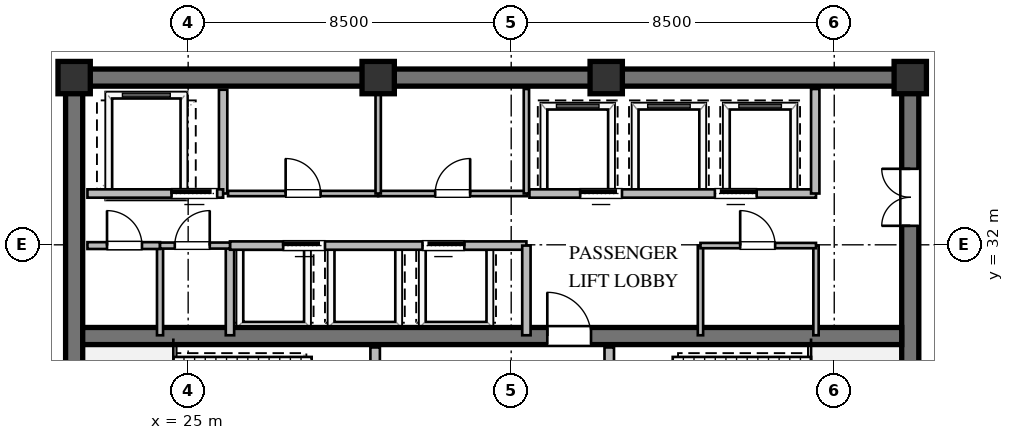
"""IFC4 building model, lengths in metres.
Left out: names, types, materials, properties, quantities, classifications, styles, units other than length and angle.
Written with IfcOpenShell. Run it as: python <this file> out.ifc"""

import sys

from ifc_helpers import new_model, si_unit, direction, frame, frame_2d, origin, origin_2d, place, context, subcontext, project, spatial, rectangle, extrude, element, fill, save


model = new_model("IFC4")
c1 = context("Model", 3, precision=1e-05, world=origin(), true_north=direction((0.0, 1.0)))
c2 = subcontext(c1, "Body", "Model", "MODEL_VIEW")
j1 = project(units=[si_unit("LENGTHUNIT", "METRE"), si_unit("PLANEANGLEUNIT", "RADIAN")], contexts=[c1])
p1 = place(None, origin())
s1 = spatial("IfcSite", under=j1, at=p1, CompositionType="ELEMENT")
p2 = place(p1, origin())
s2 = spatial("IfcBuilding", under=s1, at=p2, CompositionType="ELEMENT")
p3 = place(p2, frame((0.0, 0.0, 190.8)))
s3 = spatial("IfcBuildingStorey", under=s2, at=p3, CompositionType="ELEMENT", Elevation=190.8)
p4 = place(p3, frame((21.775, 36.4, 0.0), z_axis=(0.0, 0.0, 1.0), x_axis=(1.0, 0.0, 0.0)))
e1 = element("IfcWall", 1, at=p4, inside=s3, PredefinedType="SHEAR", context=c2, shape_type="SweptSolid", body=[
    extrude(rectangle(XDim=22.45, YDim=0.45, at=frame_2d((11.225, 0.0))), origin(), (0.0, 0.0, 1.0), 4.56),
])
p5 = place(p3, frame((22.0, 23.825, 0.0), z_axis=(0.0, 0.0, 1.0), x_axis=(0.0, 1.0, 0.0)))
e2 = element("IfcWall", 2, at=p5, inside=s3, PredefinedType="SHEAR", context=c2, shape_type="SweptSolid", body=[
    extrude(rectangle(XDim=12.35, YDim=0.45, at=frame_2d((6.175, 0.0))), origin(), (0.0, 0.0, 1.0), 4.56),
])
p6 = place(p3, frame((44.0, 23.825, 0.0), z_axis=(0.0, 0.0, 1.0), x_axis=(0.0, 1.0, 0.0)))
e3 = element("IfcWall", 3, at=p6, inside=s3, PredefinedType="SHEAR", context=c2, shape_type="SweptSolid", body=[
    extrude(rectangle(XDim=12.35, YDim=0.45, at=frame_2d((6.175, 0.0))), origin(), (0.0, 0.0, 1.0), 4.56),
])
p7 = place(p6, frame((8.675, 0.0, 0.0)))
e4 = element("IfcOpeningElement", 4, at=p7, cuts=e3, PredefinedType="OPENING", context=c2, shape_type="SweptSolid", body=[
    extrude(rectangle(XDim=1.5, YDim=2.15, at=frame_2d((0.75, 1.075))), frame((0.0, 0.235, 0.0), z_axis=(0.0, -1.0, 0.0), x_axis=(1.0, 0.0, 0.0)), (0.0, 0.0, 1.0), 0.47),
])
p8 = place(p3, frame((22.225, 29.6, 0.0), z_axis=(0.0, 0.0, 1.0), x_axis=(1.0, 0.0, 0.0)))
e5 = element("IfcWall", 5, at=p8, inside=s3, PredefinedType="SHEAR", context=c2, shape_type="SweptSolid", body=[
    extrude(rectangle(XDim=21.55, YDim=0.45, at=frame_2d((10.775, 0.0))), origin(), (0.0, 0.0, 1.0), 4.56),
])
p9 = place(p8, frame((12.225, 0.0, 0.0)))
e6 = element("IfcOpeningElement", 6, at=p9, cuts=e5, PredefinedType="OPENING", context=c2, shape_type="SweptSolid", body=[
    extrude(rectangle(XDim=1.15, YDim=2.1, at=frame_2d((0.575, 1.05))), frame((0.0, 0.235, 0.0), z_axis=(0.0, -1.0, 0.0), x_axis=(1.0, 0.0, 0.0)), (0.0, 0.0, 1.0), 0.47),
])
for number, where, z_axis, x_axis in (
    (7, (44.0, 36.4, 0.0), (0.0, 0.0, 1.0), (1.0, 0.0, 0.0)),
    (8, (36.0, 36.4, 0.0), (0.0, 0.0, 1.0), (1.0, 0.0, 0.0)),
    (9, (30.0, 36.4, 0.0), (0.0, 0.0, 1.0), (1.0, 0.0, 0.0)),
    (10, (22.0, 36.4, 0.0), (0.0, 0.0, 1.0), (1.0, 0.0, 0.0)),
):
    element("IfcColumn", number, at=place(p3, frame(where, z_axis=z_axis, x_axis=x_axis)), inside=s3, PredefinedType="COLUMN", context=c2, shape_type="SweptSolid", body=[
        extrude(rectangle(XDim=0.85, YDim=0.85, at=origin_2d()), origin(), (0.0, 0.0, 1.0), 4.8),
    ])
p10 = place(p3, frame((29.92, 23.9, 0.0), z_axis=(0.0, 0.0, 1.0), x_axis=(0.0, 1.0, 0.0)))
e11 = element("IfcWall", 11, at=p10, inside=s3, PredefinedType="SOLIDWALL", context=c2, shape_type="SweptSolid", body=[
    extrude(rectangle(XDim=5.4, YDim=0.25, at=frame_2d((2.7, 0.0))), origin(), (0.0, 0.0, 1.0), 4.56),
])
p11 = place(p10, frame((3.421, 0.0, 0.0)))
e12 = element("IfcOpeningElement", 12, at=p11, cuts=e11, PredefinedType="OPENING", context=c2, shape_type="SweptSolid", body=[
    extrude(rectangle(XDim=1.15, YDim=2.1, at=frame_2d((0.575, 1.05))), frame((0.0, 0.135, 0.0), z_axis=(0.0, -1.0, 0.0), x_axis=(1.0, 0.0, 0.0)), (0.0, 0.0, 1.0), 0.27),
])
p12 = place(p3, frame((36.08, 23.9, 0.0), z_axis=(0.0, 0.0, 1.0), x_axis=(0.0, 1.0, 0.0)))
e13 = element("IfcWall", 13, at=p12, inside=s3, PredefinedType="SOLIDWALL", context=c2, shape_type="SweptSolid", body=[
    extrude(rectangle(XDim=5.4, YDim=0.25, at=frame_2d((2.7, 0.0))), origin(), (0.0, 0.0, 1.0), 4.56),
])
p13 = place(p12, frame((3.421, 0.0, 0.0)))
e14 = element("IfcOpeningElement", 14, at=p13, cuts=e13, PredefinedType="OPENING", context=c2, shape_type="SweptSolid", body=[
    extrude(rectangle(XDim=1.15, YDim=2.1, at=frame_2d((0.575, 1.05))), frame((0.0, 0.135, 0.0), z_axis=(0.0, -1.0, 0.0), x_axis=(1.0, 0.0, 0.0)), (0.0, 0.0, 1.0), 0.27),
])
p14 = place(p3, frame((25.92, 33.35, 0.0), z_axis=(0.0, 0.0, 1.0), x_axis=(0.0, 1.0, 0.0)))
e15 = element("IfcWall", 15, at=p14, inside=s3, PredefinedType="SOLIDWALL", context=c2, shape_type="SweptSolid", body=[
    extrude(rectangle(XDim=2.73, YDim=0.22, at=frame_2d((1.365, 0.0))), origin(), (0.0, 0.0, 1.0), 4.56),
])
p15 = place(p3, frame((22.35, 33.35, 0.0), z_axis=(0.0, 0.0, 1.0), x_axis=(1.0, 0.0, 0.0)))
e16 = element("IfcWall", 16, at=p15, inside=s3, PredefinedType="SOLIDWALL", context=c2, shape_type="SweptSolid", body=[
    extrude(rectangle(XDim=3.57, YDim=0.22, at=frame_2d((1.785, 0.0))), origin(), (0.0, 0.0, 1.0), 4.56),
])
p16 = place(p15, frame((2.213, 0.0, 0.0)))
e17 = element("IfcOpeningElement", 17, at=p16, cuts=e16, PredefinedType="OPENING", context=c2, shape_type="SweptSolid", body=[
    extrude(rectangle(XDim=1.2, YDim=2.1, at=frame_2d((0.6, 1.05))), frame((0.0, 0.12, 0.0), z_axis=(0.0, -1.0, 0.0), x_axis=(1.0, 0.0, 0.0)), (0.0, 0.0, 1.0), 0.24),
])
p17 = place(p3, frame((26.1, 29.62, 0.0), z_axis=(0.0, 0.0, 1.0), x_axis=(0.0, 1.0, 0.0)))
e18 = element("IfcWall", 18, at=p17, inside=s3, PredefinedType="SOLIDWALL", context=c2, shape_type="SweptSolid", body=[
    extrude(rectangle(XDim=2.36, YDim=0.22, at=frame_2d((1.18, 0.0))), origin(), (0.0, 0.0, 1.0), 4.56),
])
p18 = place(p3, frame((26.1, 31.98, 0.0), z_axis=(0.0, 0.0, 1.0), x_axis=(1.0, 0.0, 0.0)))
e19 = element("IfcWall", 19, at=p18, inside=s3, PredefinedType="SOLIDWALL", context=c2, shape_type="SweptSolid", body=[
    extrude(rectangle(XDim=7.8, YDim=0.22, at=frame_2d((3.9, 0.0))), origin(), (0.0, 0.0, 1.0), 4.56),
])
p19 = place(p18, frame((1.4, 0.0, 0.0)))
e20 = element("IfcOpeningElement", 20, at=p19, cuts=e19, PredefinedType="OPENING", context=c2, shape_type="SweptSolid", body=[
    extrude(rectangle(XDim=1.1, YDim=2.1, at=frame_2d((0.55, 1.05))), frame((0.0, 0.12, 0.0), z_axis=(0.0, -1.0, 0.0), x_axis=(1.0, 0.0, 0.0)), (0.0, 0.0, 1.0), 0.24),
])
p20 = place(p18, frame((5.066, 0.0, 0.0)))
e21 = element("IfcOpeningElement", 21, at=p20, cuts=e19, PredefinedType="OPENING", context=c2, shape_type="SweptSolid", body=[
    extrude(rectangle(XDim=1.1, YDim=2.1, at=frame_2d((0.55, 1.05))), frame((0.0, 0.12, 0.0), z_axis=(0.0, -1.0, 0.0), x_axis=(1.0, 0.0, 0.0)), (0.0, 0.0, 1.0), 0.24),
])
p21 = place(p3, frame((33.9, 29.62, 0.0), z_axis=(0.0, 0.0, 1.0), x_axis=(0.0, 1.0, 0.0)))
e22 = element("IfcWall", 22, at=p21, inside=s3, PredefinedType="SOLIDWALL", context=c2, shape_type="SweptSolid", body=[
    extrude(rectangle(XDim=2.36, YDim=0.22, at=frame_2d((1.18, 0.0))), origin(), (0.0, 0.0, 1.0), 4.56),
])
p22 = place(p3, frame((26.05, 33.35, 0.0), z_axis=(0.0, 0.0, 1.0), x_axis=(1.0, 0.0, 0.0)))
e23 = element("IfcWall", 23, at=p22, inside=s3, PredefinedType="PARTITIONING", context=c2, shape_type="SweptSolid", body=[
    extrude(rectangle(XDim=3.95, YDim=0.14, at=frame_2d((1.975, 0.0))), origin(), (0.0, 0.0, 1.0), 4.56),
])
p23 = place(p22, frame((1.515, 0.0, 0.0)))
e24 = element("IfcOpeningElement", 24, at=p23, cuts=e23, PredefinedType="OPENING", context=c2, shape_type="SweptSolid", body=[
    extrude(rectangle(XDim=0.92, YDim=2.1, at=frame_2d((0.46, 1.05))), frame((0.0, 0.08, 0.0), z_axis=(0.0, -1.0, 0.0), x_axis=(1.0, 0.0, 0.0)), (0.0, 0.0, 1.0), 0.16),
])
p24 = place(p3, frame((30.0, 33.35, 0.0), z_axis=(0.0, 0.0, 1.0), x_axis=(1.0, 0.0, 0.0)))
e25 = element("IfcWall", 25, at=p24, inside=s3, PredefinedType="PARTITIONING", context=c2, shape_type="SweptSolid", body=[
    extrude(rectangle(XDim=3.92, YDim=0.14, at=frame_2d((1.96, 0.0))), origin(), (0.0, 0.0, 1.0), 4.56),
])
p25 = place(p24, frame((1.5, 0.0, 0.0)))
e26 = element("IfcOpeningElement", 26, at=p25, cuts=e25, PredefinedType="OPENING", context=c2, shape_type="SweptSolid", body=[
    extrude(rectangle(XDim=0.92, YDim=2.1, at=frame_2d((0.46, 1.05))), frame((0.0, 0.08, 0.0), z_axis=(0.0, -1.0, 0.0), x_axis=(1.0, 0.0, 0.0)), (0.0, 0.0, 1.0), 0.16),
])
for number, where, z_axis, x_axis in (
    (27, (30.0, 33.35, 0.0), (0.0, 0.0, 1.0), (0.0, 1.0, 0.0)),
    (28, (33.9, 33.35, 0.0), (0.0, 0.0, 1.0), (0.0, 1.0, 0.0)),
):
    element("IfcWall", number, at=place(p3, frame(where, z_axis=z_axis, x_axis=x_axis)), inside=s3, PredefinedType="PARTITIONING", context=c2, shape_type="SweptSolid", body=[
        extrude(rectangle(XDim=2.75, YDim=0.14, at=frame_2d((1.375, 0.0))), origin(), (0.0, 0.0, 1.0), 4.56),
    ])
p26 = place(p3, frame((33.98, 33.35, 0.0), z_axis=(0.0, 0.0, 1.0), x_axis=(1.0, 0.0, 0.0)))
e29 = element("IfcWall", 29, at=p26, inside=s3, PredefinedType="SOLIDWALL", context=c2, shape_type="SweptSolid", body=[
    extrude(rectangle(XDim=7.54, YDim=0.22, at=frame_2d((3.77, 0.0))), origin(), (0.0, 0.0, 1.0), 4.56),
])
p27 = place(p26, frame((1.335, 0.0, 0.0)))
e30 = element("IfcOpeningElement", 30, at=p27, cuts=e29, PredefinedType="OPENING", context=c2, shape_type="SweptSolid", body=[
    extrude(rectangle(XDim=1.1, YDim=2.1, at=frame_2d((0.55, 1.05))), frame((0.0, 0.12, 0.0), z_axis=(0.0, -1.0, 0.0), x_axis=(1.0, 0.0, 0.0)), (0.0, 0.0, 1.0), 0.24),
])
p28 = place(p26, frame((4.879, 0.0, 0.0)))
e31 = element("IfcOpeningElement", 31, at=p28, cuts=e29, PredefinedType="OPENING", context=c2, shape_type="SweptSolid", body=[
    extrude(rectangle(XDim=1.1, YDim=2.1, at=frame_2d((0.55, 1.05))), frame((0.0, 0.12, 0.0), z_axis=(0.0, -1.0, 0.0), x_axis=(1.0, 0.0, 0.0)), (0.0, 0.0, 1.0), 0.24),
])
p29 = place(p3, frame((41.5, 33.35, 0.0), z_axis=(0.0, 0.0, 1.0), x_axis=(0.0, 1.0, 0.0)))
e32 = element("IfcWall", 32, at=p29, inside=s3, PredefinedType="SOLIDWALL", context=c2, shape_type="SweptSolid", body=[
    extrude(rectangle(XDim=2.75, YDim=0.22, at=frame_2d((1.375, 0.0))), origin(), (0.0, 0.0, 1.0), 4.56),
])
p30 = place(p3, frame((24.26, 29.62, 0.0), z_axis=(0.0, 0.0, 1.0), x_axis=(0.0, 1.0, 0.0)))
e33 = element("IfcWall", 33, at=p30, inside=s3, PredefinedType="PLUMBINGWALL", context=c2, shape_type="SweptSolid", body=[
    extrude(rectangle(XDim=2.36, YDim=0.16, at=frame_2d((1.18, 0.0))), origin(), (0.0, 0.0, 1.0), 1.887),
])
p31 = place(p3, frame((22.35, 31.98, 0.0), z_axis=(0.0, 0.0, 1.0), x_axis=(1.0, 0.0, 0.0)))
e34 = element("IfcWall", 34, at=p31, inside=s3, PredefinedType="PARTITIONING", context=c2, shape_type="SweptSolid", body=[
    extrude(rectangle(XDim=1.91, YDim=0.18, at=frame_2d((0.955, 0.0))), origin(), (0.0, 0.0, 1.0), 4.56),
])
p32 = place(p31, frame((0.515, 0.0, 0.0)))
e35 = element("IfcOpeningElement", 35, at=p32, cuts=e34, PredefinedType="OPENING", context=c2, shape_type="SweptSolid", body=[
    extrude(rectangle(XDim=0.92, YDim=2.1, at=frame_2d((0.46, 1.05))), frame((0.0, 0.1, 0.0), z_axis=(0.0, -1.0, 0.0), x_axis=(1.0, 0.0, 0.0)), (0.0, 0.0, 1.0), 0.2),
])
p33 = place(p3, frame((24.26, 31.98, 0.0), z_axis=(0.0, 0.0, 1.0), x_axis=(1.0, 0.0, 0.0)))
e36 = element("IfcWall", 36, at=p33, inside=s3, PredefinedType="PLUMBINGWALL", context=c2, shape_type="SweptSolid", body=[
    extrude(rectangle(XDim=1.84, YDim=0.16, at=frame_2d((0.92, 0.0))), origin(), (0.0, 0.0, 1.0), 4.56),
])
p34 = place(p33, frame((0.388, 0.0, 0.0)))
e37 = element("IfcOpeningElement", 37, at=p34, cuts=e36, PredefinedType="OPENING", context=c2, shape_type="SweptSolid", body=[
    extrude(rectangle(XDim=0.92, YDim=2.1, at=frame_2d((0.46, 1.05))), frame((0.0, 0.09, 0.0), z_axis=(0.0, -1.0, 0.0), x_axis=(1.0, 0.0, 0.0)), (0.0, 0.0, 1.0), 0.18),
])
p35 = place(p3, frame((38.48, 29.62, 0.0), z_axis=(0.0, 0.0, 1.0), x_axis=(0.0, 1.0, 0.0)))
e38 = element("IfcWall", 38, at=p35, inside=s3, PredefinedType="PARTITIONING", context=c2, shape_type="SweptSolid", body=[
    extrude(rectangle(XDim=2.36, YDim=0.14, at=frame_2d((1.18, 0.0))), origin(), (0.0, 0.0, 1.0), 4.56),
])
p36 = place(p3, frame((41.52, 29.62, 0.0), z_axis=(0.0, 0.0, 1.0), x_axis=(0.0, 1.0, 0.0)))
e39 = element("IfcWall", 39, at=p36, inside=s3, PredefinedType="PARTITIONING", context=c2, shape_type="SweptSolid", body=[
    extrude(rectangle(XDim=2.36, YDim=0.14, at=frame_2d((1.18, 0.0))), origin(), (0.0, 0.0, 1.0), 1.887),
])
p37 = place(p3, frame((38.48, 31.98, 0.0), z_axis=(0.0, 0.0, 1.0), x_axis=(1.0, 0.0, 0.0)))
e40 = element("IfcWall", 40, at=p37, inside=s3, PredefinedType="PARTITIONING", context=c2, shape_type="SweptSolid", body=[
    extrude(rectangle(XDim=3.04, YDim=0.14, at=frame_2d((1.52, 0.0))), origin(), (0.0, 0.0, 1.0), 4.56),
])
p38 = place(p37, frame((1.045, 0.0, 0.0)))
e41 = element("IfcOpeningElement", 41, at=p38, cuts=e40, PredefinedType="OPENING", context=c2, shape_type="SweptSolid", body=[
    extrude(rectangle(XDim=0.92, YDim=2.1, at=frame_2d((0.46, 1.05))), frame((0.0, 0.08, 0.0), z_axis=(0.0, -1.0, 0.0), x_axis=(1.0, 0.0, 0.0)), (0.0, 0.0, 1.0), 0.16),
])
p39 = place(p9, origin())
e42 = element("IfcDoor", 42, at=p39, inside=s3, OperationType="SINGLE_SWING_LEFT", PredefinedType="DOOR", context=c2, shape_type="SweptSolid", body=[
    extrude(rectangle(XDim=1.15, YDim=2.1, at=frame_2d((0.575, 1.05))), frame((0.0, 0.025, 0.0), z_axis=(0.0, -1.0, 0.0), x_axis=(1.0, 0.0, 0.0)), (0.0, 0.0, 1.0), 0.05),
])
fill(e6, e42)
p40 = place(p7, origin())
e43 = element("IfcDoor", 43, at=p40, inside=s3, OperationType="DOUBLE_DOOR_SINGLE_SWING", PredefinedType="DOOR", context=c2, shape_type="SweptSolid", body=[
    extrude(rectangle(XDim=1.5, YDim=2.15, at=frame_2d((0.75, 1.075))), frame((0.0, 0.025, 0.0), z_axis=(0.0, -1.0, 0.0), x_axis=(1.0, 0.0, 0.0)), (0.0, 0.0, 1.0), 0.05),
])
fill(e4, e43)
p41 = place(p16, origin())
e44 = element("IfcDoor", 44, at=p41, inside=s3, OperationType="SLIDING_TO_LEFT", PredefinedType="DOOR", context=c2, shape_type="SweptSolid", body=[
    extrude(rectangle(XDim=1.2, YDim=2.1, at=frame_2d((0.6, 1.05))), frame((0.0, 0.025, 0.0), z_axis=(0.0, -1.0, 0.0), x_axis=(1.0, 0.0, 0.0)), (0.0, 0.0, 1.0), 0.05),
])
fill(e17, e44)
p42 = place(p19, origin())
e45 = element("IfcDoor", 45, at=p42, inside=s3, OperationType="SLIDING_TO_LEFT", PredefinedType="DOOR", context=c2, shape_type="SweptSolid", body=[
    extrude(rectangle(XDim=1.1, YDim=2.1, at=frame_2d((0.55, 1.05))), frame((0.0, 0.025, 0.0), z_axis=(0.0, -1.0, 0.0), x_axis=(1.0, 0.0, 0.0)), (0.0, 0.0, 1.0), 0.05),
])
fill(e20, e45)
p43 = place(p20, origin())
e46 = element("IfcDoor", 46, at=p43, inside=s3, OperationType="SLIDING_TO_RIGHT", PredefinedType="DOOR", context=c2, shape_type="SweptSolid", body=[
    extrude(rectangle(XDim=1.1, YDim=2.1, at=frame_2d((0.55, 1.05))), frame((0.0, 0.025, 0.0), z_axis=(0.0, -1.0, 0.0), x_axis=(1.0, 0.0, 0.0)), (0.0, 0.0, 1.0), 0.05),
])
fill(e21, e46)
p44 = place(p23, origin())
e47 = element("IfcDoor", 47, at=p44, inside=s3, OperationType="SINGLE_SWING_LEFT", PredefinedType="DOOR", context=c2, shape_type="SweptSolid", body=[
    extrude(rectangle(XDim=0.92, YDim=2.1, at=frame_2d((0.46, 1.05))), frame((0.0, 0.025, 0.0), z_axis=(0.0, -1.0, 0.0), x_axis=(1.0, 0.0, 0.0)), (0.0, 0.0, 1.0), 0.05),
])
fill(e24, e47)
p45 = place(p25, origin())
e48 = element("IfcDoor", 48, at=p45, inside=s3, OperationType="SINGLE_SWING_RIGHT", PredefinedType="DOOR", context=c2, shape_type="SweptSolid", body=[
    extrude(rectangle(XDim=0.92, YDim=2.1, at=frame_2d((0.46, 1.05))), frame((0.0, 0.025, 0.0), z_axis=(0.0, -1.0, 0.0), x_axis=(1.0, 0.0, 0.0)), (0.0, 0.0, 1.0), 0.05),
])
fill(e26, e48)
p46 = place(p27, origin())
e49 = element("IfcDoor", 49, at=p46, inside=s3, OperationType="SLIDING_TO_LEFT", PredefinedType="DOOR", context=c2, shape_type="SweptSolid", body=[
    extrude(rectangle(XDim=1.1, YDim=2.1, at=frame_2d((0.55, 1.05))), frame((0.0, 0.025, 0.0), z_axis=(0.0, -1.0, 0.0), x_axis=(1.0, 0.0, 0.0)), (0.0, 0.0, 1.0), 0.05),
])
fill(e30, e49)
p47 = place(p28, origin())
e50 = element("IfcDoor", 50, at=p47, inside=s3, OperationType="SLIDING_TO_RIGHT", PredefinedType="DOOR", context=c2, shape_type="SweptSolid", body=[
    extrude(rectangle(XDim=1.1, YDim=2.1, at=frame_2d((0.55, 1.05))), frame((0.0, 0.025, 0.0), z_axis=(0.0, -1.0, 0.0), x_axis=(1.0, 0.0, 0.0)), (0.0, 0.0, 1.0), 0.05),
])
fill(e31, e50)
p48 = place(p32, origin())
e51 = element("IfcDoor", 51, at=p48, inside=s3, OperationType="SINGLE_SWING_LEFT", PredefinedType="DOOR", context=c2, shape_type="SweptSolid", body=[
    extrude(rectangle(XDim=0.92, YDim=2.1, at=frame_2d((0.46, 1.05))), frame((0.0, 0.025, 0.0), z_axis=(0.0, -1.0, 0.0), x_axis=(1.0, 0.0, 0.0)), (0.0, 0.0, 1.0), 0.05),
])
fill(e35, e51)
p49 = place(p34, origin())
e52 = element("IfcDoor", 52, at=p49, inside=s3, OperationType="SINGLE_SWING_RIGHT", PredefinedType="DOOR", context=c2, shape_type="SweptSolid", body=[
    extrude(rectangle(XDim=0.92, YDim=2.1, at=frame_2d((0.46, 1.05))), frame((0.0, 0.025, 0.0), z_axis=(0.0, -1.0, 0.0), x_axis=(1.0, 0.0, 0.0)), (0.0, 0.0, 1.0), 0.05),
])
fill(e37, e52)
p50 = place(p38, origin())
e53 = element("IfcDoor", 53, at=p50, inside=s3, OperationType="SINGLE_SWING_LEFT", PredefinedType="DOOR", context=c2, shape_type="SweptSolid", body=[
    extrude(rectangle(XDim=0.92, YDim=2.1, at=frame_2d((0.46, 1.05))), frame((0.0, 0.025, 0.0), z_axis=(0.0, -1.0, 0.0), x_axis=(1.0, 0.0, 0.0)), (0.0, 0.0, 1.0), 0.05),
])
fill(e41, e53)
save(model, sys.argv[1])
